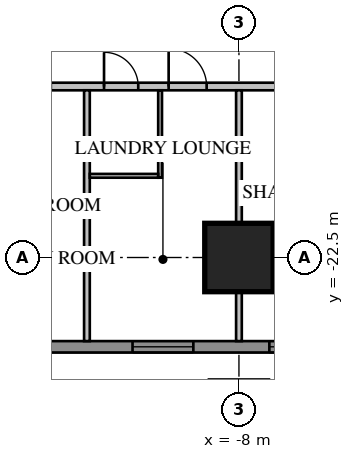
"""IFC4 building model, lengths in metres.
Left out: names, types, materials, properties, quantities, classifications, styles, units other than length and angle.
Written with IfcOpenShell. Run it as: python <this file> out.ifc"""

import sys

from ifc_helpers import new_model, si_unit, direction, frame, frame_2d, origin, origin_2d, place, context, subcontext, project, spatial, rectangle, extrude, element, fill, save


model = new_model("IFC4")
c1 = context("Model", 3, precision=1e-05, world=origin(), true_north=direction((0.0, 1.0)))
c2 = subcontext(c1, "Body", "Model", "MODEL_VIEW")
j1 = project(units=[si_unit("LENGTHUNIT", "METRE"), si_unit("PLANEANGLEUNIT", "RADIAN")], contexts=[c1])
p1 = place(None, origin())
s1 = spatial("IfcSite", under=j1, at=p1, CompositionType="ELEMENT")
p2 = place(p1, origin())
s2 = spatial("IfcBuilding", under=s1, at=p2, CompositionType="ELEMENT")
p3 = place(p2, frame((0.0, 0.0, 46.8)))
s3 = spatial("IfcBuildingStorey", under=s2, at=p3, CompositionType="ELEMENT", Elevation=46.8)
p4 = place(p3, frame((-8.0, -22.5, 0.0), z_axis=(0.0, 0.0, 1.0), x_axis=(1.0, 0.0, 0.0)))
e1 = element("IfcColumn", 1, at=p4, inside=s3, PredefinedType="COLUMN", context=c2, shape_type="SweptSolid", body=[
    extrude(rectangle(XDim=1.8, YDim=1.8, at=origin_2d()), origin(), (0.0, 0.0, 1.0), 3.85),
])
p5 = place(p3, frame((-16.0, -24.85, 0.0), z_axis=(0.0, 0.0, 1.0), x_axis=(1.0, 0.0, 0.0)))
e2 = element("IfcWall", 2, at=p5, inside=s3, PredefinedType="SOLIDWALL", context=c2, shape_type="SweptSolid", body=[
    extrude(rectangle(XDim=32.0, YDim=0.3, at=frame_2d((16.0, 0.0))), origin(), (0.0, 0.0, 1.0), 3.65),
])
p6 = place(p5, frame((1.2, 0.0, 0.75)))
e3 = element("IfcOpeningElement", 3, at=p6, cuts=e2, PredefinedType="OPENING", context=c2, shape_type="SweptSolid", body=[
    extrude(rectangle(XDim=1.6, YDim=1.8, at=frame_2d((0.8, 0.9))), frame((0.0, 0.17, 0.0), z_axis=(0.0, -1.0, 0.0), x_axis=(1.0, 0.0, 0.0)), (0.0, 0.0, 1.0), 0.34),
])
p7 = place(p5, frame((5.2, 0.0, 0.75)))
e4 = element("IfcOpeningElement", 4, at=p7, cuts=e2, PredefinedType="OPENING", context=c2, shape_type="SweptSolid", body=[
    extrude(rectangle(XDim=1.6, YDim=1.8, at=frame_2d((0.8, 0.9))), frame((0.0, 0.17, 0.0), z_axis=(0.0, -1.0, 0.0), x_axis=(1.0, 0.0, 0.0)), (0.0, 0.0, 1.0), 0.34),
])
p8 = place(p5, frame((17.2, 0.0, 0.75)))
e5 = element("IfcOpeningElement", 5, at=p8, cuts=e2, PredefinedType="OPENING", context=c2, shape_type="SweptSolid", body=[
    extrude(rectangle(XDim=1.6, YDim=1.8, at=frame_2d((0.8, 0.9))), frame((0.0, 0.17, 0.0), z_axis=(0.0, -1.0, 0.0), x_axis=(1.0, 0.0, 0.0)), (0.0, 0.0, 1.0), 0.34),
])
p9 = place(p5, frame((21.2, 0.0, 0.75)))
e6 = element("IfcOpeningElement", 6, at=p9, cuts=e2, PredefinedType="OPENING", context=c2, shape_type="SweptSolid", body=[
    extrude(rectangle(XDim=1.6, YDim=1.8, at=frame_2d((0.8, 0.9))), frame((0.0, 0.17, 0.0), z_axis=(0.0, -1.0, 0.0), x_axis=(1.0, 0.0, 0.0)), (0.0, 0.0, 1.0), 0.34),
])
p10 = place(p5, frame((25.2, 0.0, 0.75)))
e7 = element("IfcOpeningElement", 7, at=p10, cuts=e2, PredefinedType="OPENING", context=c2, shape_type="SweptSolid", body=[
    extrude(rectangle(XDim=1.6, YDim=1.8, at=frame_2d((0.8, 0.9))), frame((0.0, 0.17, 0.0), z_axis=(0.0, -1.0, 0.0), x_axis=(1.0, 0.0, 0.0)), (0.0, 0.0, 1.0), 0.34),
])
p11 = place(p5, frame((29.2, 0.0, 0.75)))
e8 = element("IfcOpeningElement", 8, at=p11, cuts=e2, PredefinedType="OPENING", context=c2, shape_type="SweptSolid", body=[
    extrude(rectangle(XDim=1.6, YDim=1.8, at=frame_2d((0.8, 0.9))), frame((0.0, 0.17, 0.0), z_axis=(0.0, -1.0, 0.0), x_axis=(1.0, 0.0, 0.0)), (0.0, 0.0, 1.0), 0.34),
])
p12 = place(p5, frame((8.8, 0.0, 0.75)))
e9 = element("IfcOpeningElement", 9, at=p12, cuts=e2, PredefinedType="OPENING", context=c2, shape_type="SweptSolid", body=[
    extrude(rectangle(XDim=2.4, YDim=1.8, at=frame_2d((1.2, 0.9))), frame((0.0, 0.17, 0.0), z_axis=(0.0, -1.0, 0.0), x_axis=(1.0, 0.0, 0.0)), (0.0, 0.0, 1.0), 0.34),
])
p13 = place(p5, frame((13.812, 0.0, 0.0)))
e10 = element("IfcOpeningElement", 10, at=p13, cuts=e2, PredefinedType="OPENING", context=c2, shape_type="SweptSolid", body=[
    extrude(rectangle(XDim=1.0, YDim=2.4, at=frame_2d((0.5, 1.2))), frame((0.0, 0.17, 0.0), z_axis=(0.0, -1.0, 0.0), x_axis=(1.0, 0.0, 0.0)), (0.0, 0.0, 1.0), 0.34),
])
p14 = place(p3, frame((-18.0, -18.0, 0.0), z_axis=(0.0, 0.0, 1.0), x_axis=(1.0, 0.0, 0.0)))
e11 = element("IfcWall", 11, at=p14, inside=s3, PredefinedType="PARTITIONING", context=c2, shape_type="SweptSolid", body=[
    extrude(rectangle(XDim=36.0, YDim=0.2, at=frame_2d((18.0, 0.0))), origin(), (0.0, 0.0, 1.0), 3.65),
])
p15 = place(p14, frame((0.375, 0.0, 0.0)))
e12 = element("IfcOpeningElement", 12, at=p15, cuts=e11, PredefinedType="OPENING", context=c2, shape_type="SweptSolid", body=[
    extrude(rectangle(XDim=1.0, YDim=2.1, at=frame_2d((0.5, 1.05))), frame((0.0, 0.12, 0.0), z_axis=(0.0, -1.0, 0.0), x_axis=(1.0, 0.0, 0.0)), (0.0, 0.0, 1.0), 0.24),
])
p16 = place(p14, frame((2.45, 0.0, 0.0)))
e13 = element("IfcOpeningElement", 13, at=p16, cuts=e11, PredefinedType="OPENING", context=c2, shape_type="SweptSolid", body=[
    extrude(rectangle(XDim=0.8, YDim=2.1, at=frame_2d((0.4, 1.05))), frame((0.0, 0.12, 0.0), z_axis=(0.0, -1.0, 0.0), x_axis=(1.0, 0.0, 0.0)), (0.0, 0.0, 1.0), 0.24),
])
p17 = place(p14, frame((4.05, 0.0, 0.0)))
e14 = element("IfcOpeningElement", 14, at=p17, cuts=e11, PredefinedType="OPENING", context=c2, shape_type="SweptSolid", body=[
    extrude(rectangle(XDim=1.0, YDim=2.1, at=frame_2d((0.5, 1.05))), frame((0.0, 0.12, 0.0), z_axis=(0.0, -1.0, 0.0), x_axis=(1.0, 0.0, 0.0)), (0.0, 0.0, 1.0), 0.24),
])
p18 = place(p14, frame((6.45, 0.0, 0.0)))
e15 = element("IfcOpeningElement", 15, at=p18, cuts=e11, PredefinedType="OPENING", context=c2, shape_type="SweptSolid", body=[
    extrude(rectangle(XDim=0.9, YDim=2.1, at=frame_2d((0.45, 1.05))), frame((0.0, 0.12, 0.0), z_axis=(0.0, -1.0, 0.0), x_axis=(1.0, 0.0, 0.0)), (0.0, 0.0, 1.0), 0.24),
])
p19 = place(p14, frame((8.15, 0.0, 0.0)))
e16 = element("IfcOpeningElement", 16, at=p19, cuts=e11, PredefinedType="OPENING", context=c2, shape_type="SweptSolid", body=[
    extrude(rectangle(XDim=1.0, YDim=2.1, at=frame_2d((0.5, 1.05))), frame((0.0, 0.12, 0.0), z_axis=(0.0, -1.0, 0.0), x_axis=(1.0, 0.0, 0.0)), (0.0, 0.0, 1.0), 0.24),
])
p20 = place(p14, frame((19.95, 0.0, 0.0)))
e17 = element("IfcOpeningElement", 17, at=p20, cuts=e11, PredefinedType="OPENING", context=c2, shape_type="SweptSolid", body=[
    extrude(rectangle(XDim=0.95, YDim=2.1, at=frame_2d((0.475, 1.05))), frame((0.0, 0.12, 0.0), z_axis=(0.0, -1.0, 0.0), x_axis=(1.0, 0.0, 0.0)), (0.0, 0.0, 1.0), 0.24),
])
p21 = place(p14, frame((23.95, 0.0, 0.0)))
e18 = element("IfcOpeningElement", 18, at=p21, cuts=e11, PredefinedType="OPENING", context=c2, shape_type="SweptSolid", body=[
    extrude(rectangle(XDim=0.95, YDim=2.1, at=frame_2d((0.475, 1.05))), frame((0.0, 0.12, 0.0), z_axis=(0.0, -1.0, 0.0), x_axis=(1.0, 0.0, 0.0)), (0.0, 0.0, 1.0), 0.24),
])
p22 = place(p14, frame((27.95, 0.0, 0.0)))
e19 = element("IfcOpeningElement", 19, at=p22, cuts=e11, PredefinedType="OPENING", context=c2, shape_type="SweptSolid", body=[
    extrude(rectangle(XDim=0.95, YDim=2.1, at=frame_2d((0.475, 1.05))), frame((0.0, 0.12, 0.0), z_axis=(0.0, -1.0, 0.0), x_axis=(1.0, 0.0, 0.0)), (0.0, 0.0, 1.0), 0.24),
])
p23 = place(p14, frame((31.95, 0.0, 0.0)))
e20 = element("IfcOpeningElement", 20, at=p23, cuts=e11, PredefinedType="OPENING", context=c2, shape_type="SweptSolid", body=[
    extrude(rectangle(XDim=0.95, YDim=2.1, at=frame_2d((0.475, 1.05))), frame((0.0, 0.12, 0.0), z_axis=(0.0, -1.0, 0.0), x_axis=(1.0, 0.0, 0.0)), (0.0, 0.0, 1.0), 0.24),
])
p24 = place(p14, frame((34.375, 0.0, 0.0)))
e21 = element("IfcOpeningElement", 21, at=p24, cuts=e11, PredefinedType="OPENING", context=c2, shape_type="SweptSolid", body=[
    extrude(rectangle(XDim=0.95, YDim=2.1, at=frame_2d((0.475, 1.05))), frame((0.0, 0.12, 0.0), z_axis=(0.0, -1.0, 0.0), x_axis=(1.0, 0.0, 0.0)), (0.0, 0.0, 1.0), 0.24),
])
p25 = place(p14, frame((11.2, 0.0, 0.0)))
e22 = element("IfcOpeningElement", 22, at=p25, cuts=e11, PredefinedType="OPENING", context=c2, shape_type="SweptSolid", body=[
    extrude(rectangle(XDim=1.0, YDim=2.1, at=frame_2d((0.5, 1.05))), frame((0.0, 0.12, 0.0), z_axis=(0.0, -1.0, 0.0), x_axis=(1.0, 0.0, 0.0)), (0.0, 0.0, 1.0), 0.24),
])
for number, where, z_axis, x_axis in (
    (23, (-12.0, -18.1, 0.0), (0.0, 0.0, 1.0), (0.0, -1.0, 0.0)),
    (24, (-8.0, -18.1, 0.0), (0.0, 0.0, 1.0), (0.0, -1.0, 0.0)),
):
    element("IfcWall", number, at=place(p3, frame(where, z_axis=z_axis, x_axis=x_axis)), inside=s3, PredefinedType="PARTITIONING", context=c2, shape_type="SweptSolid", body=[
        extrude(rectangle(XDim=6.6, YDim=0.15, at=frame_2d((3.3, 0.0))), origin(), (0.0, 0.0, 1.0), 3.65),
    ])
p26 = place(p3, frame((-10.075, -18.1, 0.0), z_axis=(0.0, 0.0, 1.0), x_axis=(0.0, -1.0, 0.0)))
e25 = element("IfcWall", 25, at=p26, inside=s3, PredefinedType="PARTITIONING", context=c2, shape_type="SweptSolid", body=[
    extrude(rectangle(XDim=2.3, YDim=0.1, at=frame_2d((1.15, 0.0))), origin(), (0.0, 0.0, 1.0), 3.65),
])
p27 = place(p3, frame((-11.925, -20.35, 0.0), z_axis=(0.0, 0.0, 1.0), x_axis=(1.0, 0.0, 0.0)))
e26 = element("IfcWall", 26, at=p27, inside=s3, PredefinedType="PARTITIONING", context=c2, shape_type="SweptSolid", body=[
    extrude(rectangle(XDim=1.8, YDim=0.1, at=frame_2d((0.9, 0.0))), origin(), (0.0, 0.0, 1.0), 3.65),
])
p28 = place(p7, origin())
e27 = element("IfcWindow", 27, at=p28, inside=s3, PartitioningType="SINGLE_PANEL", PredefinedType="WINDOW", context=c2, shape_type="SweptSolid", body=[
    extrude(rectangle(XDim=1.6, YDim=1.8, at=frame_2d((0.8, 0.9))), frame((0.0, 0.03, 0.0), z_axis=(0.0, -1.0, 0.0), x_axis=(1.0, 0.0, 0.0)), (0.0, 0.0, 1.0), 0.06),
])
fill(e4, e27)
p29 = place(p12, origin())
e28 = element("IfcWindow", 28, at=p29, inside=s3, PartitioningType="SINGLE_PANEL", PredefinedType="WINDOW", context=c2, shape_type="SweptSolid", body=[
    extrude(rectangle(XDim=2.4, YDim=1.8, at=frame_2d((1.2, 0.9))), frame((0.0, 0.03, 0.0), z_axis=(0.0, -1.0, 0.0), x_axis=(1.0, 0.0, 0.0)), (0.0, 0.0, 1.0), 0.06),
])
fill(e9, e28)
p30 = place(p18, origin())
e29 = element("IfcDoor", 29, at=p30, inside=s3, OperationType="SINGLE_SWING_LEFT", PredefinedType="DOOR", context=c2, shape_type="SweptSolid", body=[
    extrude(rectangle(XDim=0.9, YDim=2.1, at=frame_2d((0.45, 1.05))), frame((0.0, 0.025, 0.0), z_axis=(0.0, -1.0, 0.0), x_axis=(1.0, 0.0, 0.0)), (0.0, 0.0, 1.0), 0.05),
])
fill(e15, e29)
p31 = place(p19, origin())
e30 = element("IfcDoor", 30, at=p31, inside=s3, OperationType="SINGLE_SWING_LEFT", PredefinedType="DOOR", context=c2, shape_type="SweptSolid", body=[
    extrude(rectangle(XDim=1.0, YDim=2.1, at=frame_2d((0.5, 1.05))), frame((0.0, 0.025, 0.0), z_axis=(0.0, -1.0, 0.0), x_axis=(1.0, 0.0, 0.0)), (0.0, 0.0, 1.0), 0.05),
])
fill(e16, e30)
save(model, sys.argv[1])
